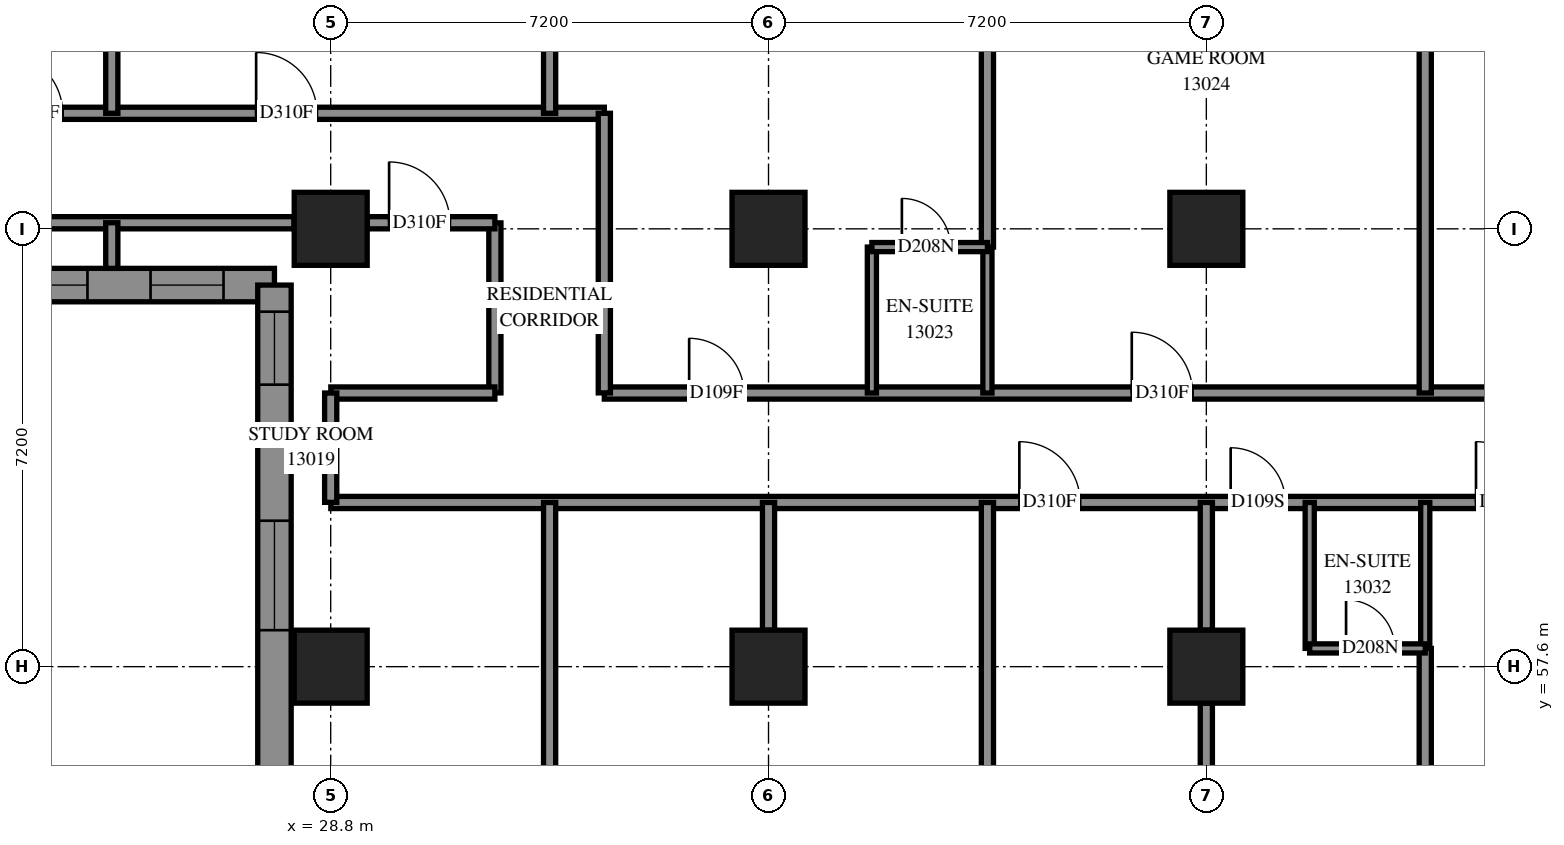
"""IFC4 building model, lengths in metres.
Left out: names, types, materials, properties, quantities, classifications, styles, units other than length and angle.
Written with IfcOpenShell. Run it as: python <this file> out.ifc"""

import sys

from ifc_helpers import new_model, si_unit, direction, frame, frame_2d, origin, origin_2d, place, context, subcontext, project, spatial, polyline, rectangle, outline, extrude, element, fill, save


model = new_model("IFC4")
c1 = context("Model", 3, precision=1e-05, world=origin(), true_north=direction((0.0, 1.0)))
c2 = subcontext(c1, "Body", "Model", "MODEL_VIEW")
j1 = project(units=[si_unit("LENGTHUNIT", "METRE"), si_unit("PLANEANGLEUNIT", "RADIAN")], contexts=[c1])
p1 = place(None, origin())
s1 = spatial("IfcSite", under=j1, at=p1, CompositionType="ELEMENT")
p2 = place(p1, origin())
s2 = spatial("IfcBuilding", under=s1, at=p2, CompositionType="ELEMENT")
p3 = place(p2, frame((0.0, 0.0, 50.8)))
s3 = spatial("IfcBuildingStorey", under=s2, at=p3, CompositionType="ELEMENT", Elevation=50.8)
for number, where, z_axis, x_axis in (
    (1, (28.8, 57.6, 0.0), (0.0, 0.0, 1.0), (1.0, 0.0, 0.0)),
    (2, (28.8, 64.8, 0.0), (0.0, 0.0, 1.0), (1.0, 0.0, 0.0)),
    (3, (36.0, 57.6, 0.0), (0.0, 0.0, 1.0), (1.0, 0.0, 0.0)),
    (4, (36.0, 64.8, 0.0), (0.0, 0.0, 1.0), (1.0, 0.0, 0.0)),
    (5, (43.2, 57.6, 0.0), (0.0, 0.0, 1.0), (1.0, 0.0, 0.0)),
    (6, (43.2, 64.8, 0.0), (0.0, 0.0, 1.0), (1.0, 0.0, 0.0)),
):
    element("IfcColumn", number, at=place(p3, frame(where, z_axis=z_axis, x_axis=x_axis)), inside=s3, PredefinedType="COLUMN", context=c2, shape_type="SweptSolid", body=[
        extrude(rectangle(XDim=1.2, YDim=1.2, at=origin_2d()), origin(), (0.0, 0.0, 1.0), 3.1),
    ])
p4 = place(p3, frame((19.563, 63.875, 0.0), z_axis=(0.0, 0.0, 1.0), x_axis=(1.0, 0.0, 0.0)))
e7 = element("IfcWall", 7, at=p4, inside=s3, PredefinedType="SOLIDWALL", context=c2, shape_type="SweptSolid", body=[
    extrude(outline(polyline([(-0.275, -0.275), (8.037, -0.275), (8.587, 0.275), (0.275, 0.275), (-0.275, -0.275)])), origin(), (0.0, 0.0, 1.0), 3.1),
])
p5 = place(p4, frame((2.437, 0.0, 0.5)))
e8 = element("IfcOpeningElement", 8, at=p5, cuts=e7, PredefinedType="OPENING", context=c2, shape_type="SweptSolid", body=[
    extrude(rectangle(XDim=2.8, YDim=2.45, at=frame_2d((1.4, 1.225))), frame((0.0, 0.285, 0.0), z_axis=(0.0, -1.0, 0.0), x_axis=(1.0, 0.0, 0.0)), (0.0, 0.0, 1.0), 0.57),
])
p6 = place(p4, frame((6.274, 0.0, 0.5)))
e9 = element("IfcOpeningElement", 9, at=p6, cuts=e7, PredefinedType="OPENING", context=c2, shape_type="SweptSolid", body=[
    extrude(rectangle(XDim=1.2, YDim=2.45, at=frame_2d((0.6, 1.225))), frame((0.0, 0.285, 0.0), z_axis=(0.0, -1.0, 0.0), x_axis=(1.0, 0.0, 0.0)), (0.0, 0.0, 1.0), 0.57),
])
p7 = place(p3, frame((27.875, 63.875, 0.0), z_axis=(0.0, 0.0, 1.0), x_axis=(0.0, -1.0, 0.0)))
e10 = element("IfcWall", 10, at=p7, inside=s3, PredefinedType="SOLIDWALL", context=c2, shape_type="SweptSolid", body=[
    extrude(outline(polyline([(0.275, -0.275), (8.587, -0.275), (8.037, 0.275), (-0.275, 0.275), (0.275, -0.275)])), origin(), (0.0, 0.0, 1.0), 3.1),
])
p8 = place(p7, frame((0.438, 0.0, 0.5)))
e11 = element("IfcOpeningElement", 11, at=p8, cuts=e10, PredefinedType="OPENING", context=c2, shape_type="SweptSolid", body=[
    extrude(rectangle(XDim=1.2, YDim=2.45, at=frame_2d((0.6, 1.225))), frame((0.0, 0.285, 0.0), z_axis=(0.0, -1.0, 0.0), x_axis=(1.0, 0.0, 0.0)), (0.0, 0.0, 1.0), 0.57),
])
p9 = place(p7, frame((3.875, 0.0, 0.7)))
e12 = element("IfcOpeningElement", 12, at=p9, cuts=e10, PredefinedType="OPENING", context=c2, shape_type="SweptSolid", body=[
    extrude(rectangle(XDim=1.8, YDim=2.2, at=frame_2d((0.9, 1.1))), frame((0.0, 0.285, 0.0), z_axis=(0.0, -1.0, 0.0), x_axis=(1.0, 0.0, 0.0)), (0.0, 0.0, 1.0), 0.57),
])
p10 = place(p3, frame((28.802, 60.3, 0.0), z_axis=(0.0, 0.0, 1.0), x_axis=(1.0, 0.0, 0.0)))
e13 = element("IfcWall", 13, at=p10, inside=s3, PredefinedType="PARTITIONING", context=c2, shape_type="SweptSolid", body=[
    extrude(rectangle(XDim=24.108, YDim=0.2, at=frame_2d((12.054, 0.0))), origin(), (0.0, 0.0, 1.0), 3.1),
])
p11 = place(p10, frame((11.323, 0.0, 0.0)))
e14 = element("IfcOpeningElement", 14, at=p11, cuts=e13, PredefinedType="OPENING", context=c2, shape_type="SweptSolid", body=[
    extrude(rectangle(XDim=1.0, YDim=2.1, at=frame_2d((0.5, 1.05))), frame((0.0, 0.11, 0.0), z_axis=(0.0, -1.0, 0.0), x_axis=(1.0, 0.0, 0.0)), (0.0, 0.0, 1.0), 0.22),
])
p12 = place(p10, frame((14.798, 0.0, 0.0)))
e15 = element("IfcOpeningElement", 15, at=p12, cuts=e13, PredefinedType="OPENING", context=c2, shape_type="SweptSolid", body=[
    extrude(rectangle(XDim=0.9, YDim=2.1, at=frame_2d((0.45, 1.05))), frame((0.0, 0.11, 0.0), z_axis=(0.0, -1.0, 0.0), x_axis=(1.0, 0.0, 0.0)), (0.0, 0.0, 1.0), 0.22),
])
p13 = place(p10, frame((18.833, 0.0, 0.0)))
e16 = element("IfcOpeningElement", 16, at=p13, cuts=e13, PredefinedType="OPENING", context=c2, shape_type="SweptSolid", body=[
    extrude(rectangle(XDim=1.0, YDim=2.1, at=frame_2d((0.5, 1.05))), frame((0.0, 0.11, 0.0), z_axis=(0.0, -1.0, 0.0), x_axis=(1.0, 0.0, 0.0)), (0.0, 0.0, 1.0), 0.22),
])
p14 = place(p10, frame((22.839, 0.0, 0.0)))
e17 = element("IfcOpeningElement", 17, at=p14, cuts=e13, PredefinedType="OPENING", context=c2, shape_type="SweptSolid", body=[
    extrude(rectangle(XDim=1.0, YDim=2.1, at=frame_2d((0.5, 1.05))), frame((0.0, 0.11, 0.0), z_axis=(0.0, -1.0, 0.0), x_axis=(1.0, 0.0, 0.0)), (0.0, 0.0, 1.0), 0.22),
])
p15 = place(p3, frame((33.3, 62.1, 0.0), z_axis=(0.0, 0.0, 1.0), x_axis=(1.0, 0.0, 0.0)))
e18 = element("IfcWall", 18, at=p15, inside=s3, PredefinedType="PARTITIONING", context=c2, shape_type="SweptSolid", body=[
    extrude(rectangle(XDim=21.2, YDim=0.2, at=frame_2d((10.6, 0.0))), origin(), (0.0, 0.0, 1.0), 3.1),
])
p16 = place(p15, frame((1.395, 0.0, 0.0)))
e19 = element("IfcOpeningElement", 19, at=p16, cuts=e18, PredefinedType="OPENING", context=c2, shape_type="SweptSolid", body=[
    extrude(rectangle(XDim=0.9, YDim=2.1, at=frame_2d((0.45, 1.05))), frame((0.0, 0.11, 0.0), z_axis=(0.0, -1.0, 0.0), x_axis=(1.0, 0.0, 0.0)), (0.0, 0.0, 1.0), 0.22),
])
p17 = place(p15, frame((8.674, 0.0, 0.0)))
e20 = element("IfcOpeningElement", 20, at=p17, cuts=e18, PredefinedType="OPENING", context=c2, shape_type="SweptSolid", body=[
    extrude(rectangle(XDim=1.0, YDim=2.1, at=frame_2d((0.5, 1.05))), frame((0.0, 0.11, 0.0), z_axis=(0.0, -1.0, 0.0), x_axis=(1.0, 0.0, 0.0)), (0.0, 0.0, 1.0), 0.22),
])
p18 = place(p15, frame((15.874, 0.0, 0.0)))
e21 = element("IfcOpeningElement", 21, at=p18, cuts=e18, PredefinedType="OPENING", context=c2, shape_type="SweptSolid", body=[
    extrude(rectangle(XDim=1.0, YDim=2.1, at=frame_2d((0.5, 1.05))), frame((0.0, 0.11, 0.0), z_axis=(0.0, -1.0, 0.0), x_axis=(1.0, 0.0, 0.0)), (0.0, 0.0, 1.0), 0.22),
])
p19 = place(p3, frame((21.602, 66.7, 0.0), z_axis=(0.0, 0.0, 1.0), x_axis=(1.0, 0.0, 0.0)))
e22 = element("IfcWall", 22, at=p19, inside=s3, PredefinedType="PARTITIONING", context=c2, shape_type="SweptSolid", body=[
    extrude(rectangle(XDim=11.698, YDim=0.2, at=frame_2d((5.849, 0.0))), origin(), (0.0, 0.0, 1.0), 3.1),
])
p20 = place(p19, frame((1.79, 0.0, 0.0)))
e23 = element("IfcOpeningElement", 23, at=p20, cuts=e22, PredefinedType="OPENING", context=c2, shape_type="SweptSolid", body=[
    extrude(rectangle(XDim=1.0, YDim=2.1, at=frame_2d((0.5, 1.05))), frame((0.0, 0.11, 0.0), z_axis=(0.0, -1.0, 0.0), x_axis=(1.0, 0.0, 0.0)), (0.0, 0.0, 1.0), 0.22),
])
p21 = place(p19, frame((5.972, 0.0, 0.0)))
e24 = element("IfcOpeningElement", 24, at=p21, cuts=e22, PredefinedType="OPENING", context=c2, shape_type="SweptSolid", body=[
    extrude(rectangle(XDim=1.0, YDim=2.1, at=frame_2d((0.5, 1.05))), frame((0.0, 0.11, 0.0), z_axis=(0.0, -1.0, 0.0), x_axis=(1.0, 0.0, 0.0)), (0.0, 0.0, 1.0), 0.22),
])
p22 = place(p3, frame((46.8, 62.1, 0.0), z_axis=(0.0, 0.0, 1.0), x_axis=(0.0, 1.0, 0.0)))
e25 = element("IfcWall", 25, at=p22, inside=s3, PredefinedType="PARTITIONING", context=c2, shape_type="SweptSolid", body=[
    extrude(rectangle(XDim=10.664, YDim=0.2, at=frame_2d((5.332, 0.0))), origin(), (0.0, 0.0, 1.0), 3.1),
])
p23 = place(p3, frame((39.6, 64.5, 0.0), z_axis=(0.0, 0.0, 1.0), x_axis=(0.0, 1.0, 0.0)))
e26 = element("IfcWall", 26, at=p23, inside=s3, PredefinedType="PARTITIONING", context=c2, shape_type="SweptSolid", body=[
    extrude(rectangle(XDim=8.319, YDim=0.2, at=frame_2d((4.159, 0.0))), origin(), (0.0, 0.0, 1.0), 3.1),
])
p24 = place(p3, frame((46.8, 49.75, 0.0), z_axis=(0.0, 0.0, 1.0), x_axis=(0.0, 1.0, 0.0)))
e27 = element("IfcWall", 27, at=p24, inside=s3, PredefinedType="PARTITIONING", context=c2, shape_type="SweptSolid", body=[
    extrude(rectangle(XDim=8.15, YDim=0.2, at=frame_2d((4.075, 0.0))), origin(), (0.0, 0.0, 1.0), 3.1),
])
p25 = place(p3, frame((25.2, 66.7, 0.0), z_axis=(0.0, 0.0, 1.0), x_axis=(0.0, 1.0, 0.0)))
e28 = element("IfcWall", 28, at=p25, inside=s3, PredefinedType="PARTITIONING", context=c2, shape_type="SweptSolid", body=[
    extrude(rectangle(XDim=6.229, YDim=0.2, at=frame_2d((3.114, 0.0))), origin(), (0.0, 0.0, 1.0), 3.1),
])
p26 = place(p3, frame((32.4, 66.7, 0.0), z_axis=(0.0, 0.0, 1.0), x_axis=(0.0, 1.0, 0.0)))
e29 = element("IfcWall", 29, at=p26, inside=s3, PredefinedType="PARTITIONING", context=c2, shape_type="SweptSolid", body=[
    extrude(rectangle(XDim=6.174, YDim=0.2, at=frame_2d((3.087, 0.0))), origin(), (0.0, 0.0, 1.0), 3.1),
])
for number, where, z_axis, x_axis in (
    (30, (22.2, 64.9, 0.0), (0.0, 0.0, 1.0), (1.0, 0.0, 0.0)),
    (31, (43.2, 51.0, 0.0), (0.0, 0.0, 1.0), (0.0, 1.0, 0.0)),
):
    element("IfcWall", number, at=place(p3, frame(where, z_axis=z_axis, x_axis=x_axis)), inside=s3, PredefinedType="PARTITIONING", context=c2, shape_type="SweptSolid", body=[
        extrude(rectangle(XDim=6.0, YDim=0.2, at=frame_2d((3.0, 0.0))), origin(), (0.0, 0.0, 1.0), 2.6),
    ])
p27 = place(p3, frame((33.3, 62.102, 0.0), z_axis=(0.0, 0.0, 1.0), x_axis=(0.0, 1.0, 0.0)))
e32 = element("IfcWall", 32, at=p27, inside=s3, PredefinedType="PARTITIONING", context=c2, shape_type="SweptSolid", body=[
    extrude(rectangle(XDim=4.598, YDim=0.2, at=frame_2d((2.299, 0.0))), origin(), (0.0, 0.0, 1.0), 3.1),
])
for number, where, z_axis, x_axis in (
    (33, (32.4, 55.838, 0.0), (0.0, 0.0, 1.0), (0.0, 1.0, 0.0)),
    (34, (39.6, 55.838, 0.0), (0.0, 0.0, 1.0), (0.0, 1.0, 0.0)),
):
    element("IfcWall", number, at=place(p3, frame(where, z_axis=z_axis, x_axis=x_axis)), inside=s3, PredefinedType="PARTITIONING", context=c2, shape_type="SweptSolid", body=[
        extrude(rectangle(XDim=4.462, YDim=0.2, at=frame_2d((2.231, 0.0))), origin(), (0.0, 0.0, 1.0), 3.1),
    ])
p28 = place(p3, frame((31.5, 62.102, 0.0), z_axis=(0.0, 0.0, 1.0), x_axis=(0.0, 1.0, 0.0)))
e35 = element("IfcWall", 35, at=p28, inside=s3, PredefinedType="PARTITIONING", context=c2, shape_type="SweptSolid", body=[
    extrude(rectangle(XDim=2.796, YDim=0.2, at=frame_2d((1.398, 0.0))), origin(), (0.0, 0.0, 1.0), 3.1),
])
p29 = place(p3, frame((28.802, 62.1, 0.0), z_axis=(0.0, 0.0, 1.0), x_axis=(1.0, 0.0, 0.0)))
e36 = element("IfcWall", 36, at=p29, inside=s3, PredefinedType="PARTITIONING", context=c2, shape_type="SweptSolid", body=[
    extrude(rectangle(XDim=2.698, YDim=0.2, at=frame_2d((1.349, 0.0))), origin(), (0.0, 0.0, 1.0), 3.1),
])
for number, where, z_axis, x_axis in (
    (37, (37.7, 62.1, 0.0), (0.0, 0.0, 1.0), (0.0, 1.0, 0.0)),
    (38, (39.6, 62.1, 0.0), (0.0, 0.0, 1.0), (0.0, 1.0, 0.0)),
    (39, (44.9, 57.9, 0.0), (0.0, 0.0, 1.0), (0.0, 1.0, 0.0)),
    (40, (46.8, 57.9, 0.0), (0.0, 0.0, 1.0), (0.0, 1.0, 0.0)),
):
    element("IfcWall", number, at=place(p3, frame(where, z_axis=z_axis, x_axis=x_axis)), inside=s3, PredefinedType="PARTITIONING", context=c2, shape_type="SweptSolid", body=[
        extrude(rectangle(XDim=2.4, YDim=0.15, at=frame_2d((1.2, 0.0))), origin(), (0.0, 0.0, 1.0), 3.1),
    ])
p30 = place(p3, frame((29.4, 64.9, 0.0), z_axis=(0.0, 0.0, 1.0), x_axis=(1.0, 0.0, 0.0)))
e41 = element("IfcWall", 41, at=p30, inside=s3, PredefinedType="PARTITIONING", context=c2, shape_type="SweptSolid", body=[
    extrude(rectangle(XDim=2.1, YDim=0.2, at=frame_2d((1.05, 0.0))), origin(), (0.0, 0.0, 1.0), 3.1),
])
p31 = place(p30, frame((0.36, 0.0, 0.0)))
e42 = element("IfcOpeningElement", 42, at=p31, cuts=e41, PredefinedType="OPENING", context=c2, shape_type="SweptSolid", body=[
    extrude(rectangle(XDim=1.0, YDim=2.1, at=frame_2d((0.5, 1.05))), frame((0.0, 0.11, 0.0), z_axis=(0.0, -1.0, 0.0), x_axis=(1.0, 0.0, 0.0)), (0.0, 0.0, 1.0), 0.22),
])
for number, where, z_axis, x_axis in (
    (43, (36.0, 58.2, 0.0), (0.0, 0.0, 1.0), (0.0, 1.0, 0.0)),
    (44, (43.2, 58.2, 0.0), (0.0, 0.0, 1.0), (0.0, 1.0, 0.0)),
):
    element("IfcWall", number, at=place(p3, frame(where, z_axis=z_axis, x_axis=x_axis)), inside=s3, PredefinedType="PARTITIONING", context=c2, shape_type="SweptSolid", body=[
        extrude(rectangle(XDim=2.1, YDim=0.2, at=frame_2d((1.05, 0.0))), origin(), (0.0, 0.0, 1.0), 3.1),
    ])
p32 = place(p3, frame((37.7, 64.5, 0.0), z_axis=(0.0, 0.0, 1.0), x_axis=(1.0, 0.0, 0.0)))
e45 = element("IfcWall", 45, at=p32, inside=s3, PredefinedType="PARTITIONING", context=c2, shape_type="SweptSolid", body=[
    extrude(rectangle(XDim=1.9, YDim=0.15, at=frame_2d((0.95, 0.0))), origin(), (0.0, 0.0, 1.0), 3.1),
])
p33 = place(p32, frame((0.493, 0.0, 0.0)))
e46 = element("IfcOpeningElement", 46, at=p33, cuts=e45, PredefinedType="OPENING", context=c2, shape_type="SweptSolid", body=[
    extrude(rectangle(XDim=0.8, YDim=2.1, at=frame_2d((0.4, 1.05))), frame((0.0, 0.085, 0.0), z_axis=(0.0, -1.0, 0.0), x_axis=(1.0, 0.0, 0.0)), (0.0, 0.0, 1.0), 0.17),
])
p34 = place(p3, frame((44.9, 57.9, 0.0), z_axis=(0.0, 0.0, 1.0), x_axis=(1.0, 0.0, 0.0)))
e47 = element("IfcWall", 47, at=p34, inside=s3, PredefinedType="PARTITIONING", context=c2, shape_type="SweptSolid", body=[
    extrude(rectangle(XDim=1.9, YDim=0.15, at=frame_2d((0.95, 0.0))), origin(), (0.0, 0.0, 1.0), 3.1),
])
p35 = place(p34, frame((0.598, 0.0, 0.0)))
e48 = element("IfcOpeningElement", 48, at=p35, cuts=e47, PredefinedType="OPENING", context=c2, shape_type="SweptSolid", body=[
    extrude(rectangle(XDim=0.8, YDim=2.1, at=frame_2d((0.4, 1.05))), frame((0.0, 0.085, 0.0), z_axis=(0.0, -1.0, 0.0), x_axis=(1.0, 0.0, 0.0)), (0.0, 0.0, 1.0), 0.17),
])
p36 = place(p3, frame((28.8, 60.302, 0.0), z_axis=(0.0, 0.0, 1.0), x_axis=(0.0, 1.0, 0.0)))
e49 = element("IfcWall", 49, at=p36, inside=s3, PredefinedType="PARTITIONING", context=c2, shape_type="SweptSolid", body=[
    extrude(rectangle(XDim=1.798, YDim=0.2, at=frame_2d((0.899, 0.0))), origin(), (0.0, 0.0, 1.0), 2.6),
])
p37 = place(p3, frame((25.2, 64.15, 0.0), z_axis=(0.0, 0.0, 1.0), x_axis=(0.0, 1.0, 0.0)))
e50 = element("IfcWall", 50, at=p37, inside=s3, PredefinedType="PARTITIONING", context=c2, shape_type="SweptSolid", body=[
    extrude(rectangle(XDim=0.75, YDim=0.2, at=frame_2d((0.375, 0.0))), origin(), (0.0, 0.0, 1.0), 3.1),
])
p38 = place(p3, frame((28.2, 64.9, 0.0), z_axis=(0.0, 0.0, 1.0), x_axis=(1.0, 0.0, 0.0)))
e51 = element("IfcWall", 51, at=p38, inside=s3, PredefinedType="PARTITIONING", context=c2, shape_type="SweptSolid", body=[
    extrude(rectangle(XDim=1.2, YDim=0.2, at=frame_2d((0.6, 0.0))), origin(), (0.0, 0.0, 1.0), 3.1),
])
p39 = place(p5, origin())
e52 = element("IfcWindow", 52, at=p39, inside=s3, PartitioningType="SINGLE_PANEL", PredefinedType="WINDOW", context=c2, shape_type="SweptSolid", body=[
    extrude(rectangle(XDim=2.8, YDim=2.45, at=frame_2d((1.4, 1.225))), frame((0.0, 0.155, 0.0), z_axis=(0.0, -1.0, 0.0), x_axis=(1.0, 0.0, 0.0)), (0.0, 0.0, 1.0), 0.06),
])
fill(e8, e52)
p40 = place(p6, origin())
e53 = element("IfcWindow", 53, at=p40, inside=s3, PartitioningType="SINGLE_PANEL", PredefinedType="WINDOW", context=c2, shape_type="SweptSolid", body=[
    extrude(rectangle(XDim=1.2, YDim=2.45, at=frame_2d((0.6, 1.225))), frame((0.0, 0.155, 0.0), z_axis=(0.0, -1.0, 0.0), x_axis=(1.0, 0.0, 0.0)), (0.0, 0.0, 1.0), 0.06),
])
fill(e9, e53)
p41 = place(p8, origin())
e54 = element("IfcWindow", 54, at=p41, inside=s3, PartitioningType="SINGLE_PANEL", PredefinedType="WINDOW", context=c2, shape_type="SweptSolid", body=[
    extrude(rectangle(XDim=1.2, YDim=2.45, at=frame_2d((0.6, 1.225))), frame((0.0, 0.155, 0.0), z_axis=(0.0, -1.0, 0.0), x_axis=(1.0, 0.0, 0.0)), (0.0, 0.0, 1.0), 0.06),
])
fill(e11, e54)
p42 = place(p20, origin())
e55 = element("IfcDoor", 55, at=p42, inside=s3, OperationType="SINGLE_SWING_RIGHT", PredefinedType="DOOR", context=c2, shape_type="SweptSolid", body=[
    extrude(rectangle(XDim=1.0, YDim=2.1, at=frame_2d((0.5, 1.05))), frame((0.0, 0.025, 0.0), z_axis=(0.0, -1.0, 0.0), x_axis=(1.0, 0.0, 0.0)), (0.0, 0.0, 1.0), 0.05),
])
fill(e23, e55)
p43 = place(p21, origin())
e56 = element("IfcDoor", 56, at=p43, inside=s3, OperationType="SINGLE_SWING_LEFT", PredefinedType="DOOR", context=c2, shape_type="SweptSolid", body=[
    extrude(rectangle(XDim=1.0, YDim=2.1, at=frame_2d((0.5, 1.05))), frame((0.0, 0.025, 0.0), z_axis=(0.0, -1.0, 0.0), x_axis=(1.0, 0.0, 0.0)), (0.0, 0.0, 1.0), 0.05),
])
fill(e24, e56)
p44 = place(p31, origin())
e57 = element("IfcDoor", 57, at=p44, inside=s3, OperationType="SINGLE_SWING_RIGHT", PredefinedType="DOOR", context=c2, shape_type="SweptSolid", body=[
    extrude(rectangle(XDim=1.0, YDim=2.1, at=frame_2d((0.5, 1.05))), frame((0.0, 0.025, 0.0), z_axis=(0.0, -1.0, 0.0), x_axis=(1.0, 0.0, 0.0)), (0.0, 0.0, 1.0), 0.05),
])
fill(e42, e57)
p45 = place(p16, origin())
e58 = element("IfcDoor", 58, at=p45, inside=s3, OperationType="SINGLE_SWING_LEFT", PredefinedType="DOOR", context=c2, shape_type="SweptSolid", body=[
    extrude(rectangle(XDim=0.9, YDim=2.1, at=frame_2d((0.45, 1.05))), frame((0.0, 0.025, 0.0), z_axis=(0.0, -1.0, 0.0), x_axis=(1.0, 0.0, 0.0)), (0.0, 0.0, 1.0), 0.05),
])
fill(e19, e58)
p46 = place(p33, origin())
e59 = element("IfcDoor", 59, at=p46, inside=s3, OperationType="SINGLE_SWING_RIGHT", PredefinedType="DOOR", context=c2, shape_type="SweptSolid", body=[
    extrude(rectangle(XDim=0.8, YDim=2.1, at=frame_2d((0.4, 1.05))), frame((0.0, 0.025, 0.0), z_axis=(0.0, -1.0, 0.0), x_axis=(1.0, 0.0, 0.0)), (0.0, 0.0, 1.0), 0.05),
])
fill(e46, e59)
p47 = place(p17, origin())
e60 = element("IfcDoor", 60, at=p47, inside=s3, OperationType="SINGLE_SWING_LEFT", PredefinedType="DOOR", context=c2, shape_type="SweptSolid", body=[
    extrude(rectangle(XDim=1.0, YDim=2.1, at=frame_2d((0.5, 1.05))), frame((0.0, 0.025, 0.0), z_axis=(0.0, -1.0, 0.0), x_axis=(1.0, 0.0, 0.0)), (0.0, 0.0, 1.0), 0.05),
])
fill(e20, e60)
p48 = place(p11, origin())
e61 = element("IfcDoor", 61, at=p48, inside=s3, OperationType="SINGLE_SWING_RIGHT", PredefinedType="DOOR", context=c2, shape_type="SweptSolid", body=[
    extrude(rectangle(XDim=1.0, YDim=2.1, at=frame_2d((0.5, 1.05))), frame((0.0, 0.025, 0.0), z_axis=(0.0, -1.0, 0.0), x_axis=(1.0, 0.0, 0.0)), (0.0, 0.0, 1.0), 0.05),
])
fill(e14, e61)
p49 = place(p12, origin())
e62 = element("IfcDoor", 62, at=p49, inside=s3, OperationType="SINGLE_SWING_LEFT", PredefinedType="DOOR", context=c2, shape_type="SweptSolid", body=[
    extrude(rectangle(XDim=0.9, YDim=2.1, at=frame_2d((0.45, 1.05))), frame((0.0, 0.025, 0.0), z_axis=(0.0, -1.0, 0.0), x_axis=(1.0, 0.0, 0.0)), (0.0, 0.0, 1.0), 0.05),
])
fill(e15, e62)
p50 = place(p35, origin())
e63 = element("IfcDoor", 63, at=p50, inside=s3, OperationType="SINGLE_SWING_RIGHT", PredefinedType="DOOR", context=c2, shape_type="SweptSolid", body=[
    extrude(rectangle(XDim=0.8, YDim=2.1, at=frame_2d((0.4, 1.05))), frame((0.0, 0.025, 0.0), z_axis=(0.0, -1.0, 0.0), x_axis=(1.0, 0.0, 0.0)), (0.0, 0.0, 1.0), 0.05),
])
fill(e48, e63)
p51 = place(p13, origin())
e64 = element("IfcDoor", 64, at=p51, inside=s3, OperationType="SINGLE_SWING_RIGHT", PredefinedType="DOOR", context=c2, shape_type="SweptSolid", body=[
    extrude(rectangle(XDim=1.0, YDim=2.1, at=frame_2d((0.5, 1.05))), frame((0.0, 0.025, 0.0), z_axis=(0.0, -1.0, 0.0), x_axis=(1.0, 0.0, 0.0)), (0.0, 0.0, 1.0), 0.05),
])
fill(e16, e64)
p52 = place(p9, origin())
e65 = element("IfcWindow", 65, at=p52, inside=s3, PartitioningType="SINGLE_PANEL", PredefinedType="WINDOW", context=c2, shape_type="SweptSolid", body=[
    extrude(rectangle(XDim=1.8, YDim=2.2, at=frame_2d((0.9, 1.1))), frame((0.0, 0.155, 0.0), z_axis=(0.0, -1.0, 0.0), x_axis=(1.0, 0.0, 0.0)), (0.0, 0.0, 1.0), 0.06),
])
fill(e12, e65)
save(model, sys.argv[1])
